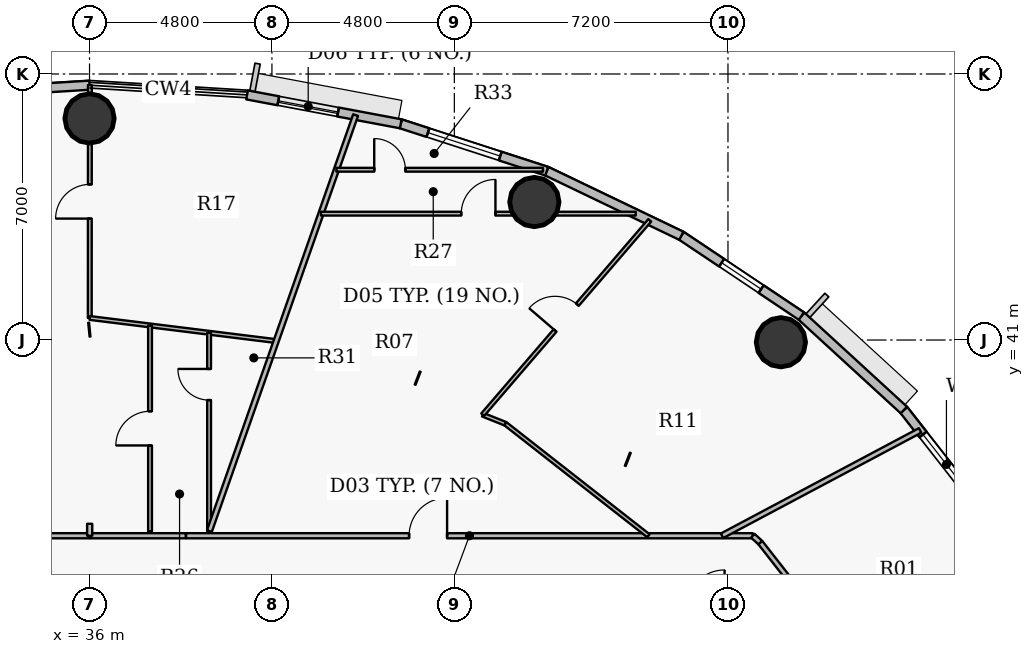
"""IFC4 building model, lengths in metres.
Left out: names, types, materials, properties, quantities, classifications, styles, units other than length and angle.
Written with IfcOpenShell. Run it as: python <this file> out.ifc"""

import sys

from ifc_helpers import new_model, si_unit, direction, frame, frame_2d, origin, origin_2d, place, context, subcontext, project, spatial, rectangle, hollow_circle, extrude, source, transform, mapped, element, fill, save


model = new_model("IFC4")
c1 = context("Model", 3, precision=1e-05, world=origin(), true_north=direction((0.0, 1.0)))
c2 = subcontext(c1, "Body", "Model", "MODEL_VIEW")
j1 = project(units=[si_unit("LENGTHUNIT", "METRE"), si_unit("PLANEANGLEUNIT", "RADIAN")], contexts=[c1])
p1 = place(None, origin())
s1 = spatial("IfcSite", under=j1, at=p1, CompositionType="ELEMENT")
p2 = place(p1, origin())
s2 = spatial("IfcBuilding", under=s1, at=p2, CompositionType="ELEMENT")
p3 = place(p2, frame((0.0, 0.0, 174.9)))
s3 = spatial("IfcBuildingStorey", under=s2, at=p3, CompositionType="ELEMENT", Elevation=174.9)
for number, where, z_axis, x_axis in (
    (1, (54.192, 40.942, 0.0), (0.0, 0.0, 1.0), (1.0, 0.0, 0.0)),
    (2, (47.706, 44.631, 0.0), (0.0, 0.0, 1.0), (1.0, 0.0, 0.0)),
    (3, (36.0, 46.83, 0.0), (0.0, 0.0, 1.0), (1.0, 0.0, 0.0)),
):
    element("IfcColumn", number, at=place(p3, frame(where, z_axis=z_axis, x_axis=x_axis)), inside=s3, PredefinedType="COLUMN", context=c2, shape_type="SweptSolid", body=[
        extrude(hollow_circle(Radius=0.65, WallThickness=0.04, at=origin_2d()), origin(), (0.0, 0.0, 1.0), 3.75),
    ])
p4 = place(p3, frame((57.428, 39.158, 0.0), z_axis=(0.0, 0.0, 1.0), x_axis=(0.616287674549, -0.787521112224, 0.0)))
e4 = element("IfcWall", 4, at=p4, inside=s3, PredefinedType="SOLIDWALL", context=c2, shape_type="SweptSolid", body=[
    extrude(rectangle(XDim=3.517, YDim=0.24, at=frame_2d((1.759, 0.0))), origin(), (0.0, 0.0, 1.0), 3.5),
])
p5 = place(p4, frame((0.819, 0.0, 0.9)))
e5 = element("IfcOpeningElement", 5, at=p5, cuts=e4, PredefinedType="OPENING", context=c2, shape_type="SweptSolid", body=[
    extrude(rectangle(XDim=2.0, YDim=1.75, at=origin_2d()), frame((1.0, 0.13, 0.875), z_axis=(0.0, -1.0, 0.0), x_axis=(1.0, 0.0, 0.0)), (0.0, 0.0, 1.0), 0.26),
])
p6 = place(p3, frame((54.732, 41.631, 0.0), z_axis=(0.0, 0.0, 1.0), x_axis=(0.737076565834, -0.675809245349, 0.0)))
e6 = element("IfcWall", 6, at=p6, inside=s3, PredefinedType="SOLIDWALL", context=c2, shape_type="SweptSolid", body=[
    extrude(rectangle(XDim=3.658, YDim=0.24, at=frame_2d((1.829, 0.0))), origin(), (0.0, 0.0, 1.0), 3.5),
])
p7 = place(p3, frame((51.573, 43.743, 0.0), z_axis=(0.0, 0.0, 1.0), x_axis=(0.831228998277, -0.555930168657, 0.0)))
e7 = element("IfcWall", 7, at=p7, inside=s3, PredefinedType="SOLIDWALL", context=c2, shape_type="SweptSolid", body=[
    extrude(rectangle(XDim=3.8, YDim=0.24, at=frame_2d((1.9, 0.0))), origin(), (0.0, 0.0, 1.0), 3.5),
])
p8 = place(p7, frame((1.275, 0.0, 0.9)))
e8 = element("IfcOpeningElement", 8, at=p8, cuts=e7, PredefinedType="OPENING", context=c2, shape_type="SweptSolid", body=[
    extrude(rectangle(XDim=1.25, YDim=1.65, at=origin_2d()), frame((0.625, 0.13, 0.825), z_axis=(0.0, -1.0, 0.0), x_axis=(1.0, 0.0, 0.0)), (0.0, 0.0, 1.0), 0.26),
])
p9 = place(p3, frame((48.03, 45.444, 0.0), z_axis=(0.0, 0.0, 1.0), x_axis=(0.901564733809, -0.432644231155, 0.0)))
e9 = element("IfcWall", 9, at=p9, inside=s3, PredefinedType="SOLIDWALL", context=c2, shape_type="SweptSolid", body=[
    extrude(rectangle(XDim=3.93, YDim=0.24, at=frame_2d((1.965, 0.0))), origin(), (0.0, 0.0, 1.0), 3.5),
])
p10 = place(p3, frame((44.189, 46.689, 0.0), z_axis=(0.0, 0.0, 1.0), x_axis=(0.951209870236, -0.30854462038, 0.0)))
e10 = element("IfcWall", 10, at=p10, inside=s3, PredefinedType="SOLIDWALL", context=c2, shape_type="SweptSolid", body=[
    extrude(rectangle(XDim=4.038, YDim=0.24, at=frame_2d((2.019, 0.0))), origin(), (0.0, 0.0, 1.0), 3.5),
])
p11 = place(p10, frame((0.753, 0.0, 0.9)))
e11 = element("IfcOpeningElement", 11, at=p11, cuts=e10, PredefinedType="OPENING", context=c2, shape_type="SweptSolid", body=[
    extrude(rectangle(XDim=2.0, YDim=1.75, at=origin_2d()), frame((1.0, 0.13, 0.875), z_axis=(0.0, -1.0, 0.0), x_axis=(1.0, 0.0, 0.0)), (0.0, 0.0, 1.0), 0.26),
])
p12 = place(p3, frame((40.146, 47.449, 0.0), z_axis=(0.0, 0.0, 1.0), x_axis=(0.982788108205, -0.184736391573, 0.0)))
e12 = element("IfcWall", 12, at=p12, inside=s3, PredefinedType="SOLIDWALL", context=c2, shape_type="SweptSolid", body=[
    extrude(rectangle(XDim=4.114, YDim=0.24, at=frame_2d((2.057, 0.0))), origin(), (0.0, 0.0, 1.0), 3.5),
])
p13 = place(p12, frame((0.836, 0.0, 0.9)))
e13 = element("IfcOpeningElement", 13, at=p13, cuts=e12, PredefinedType="OPENING", context=c2, shape_type="SweptSolid", body=[
    extrude(rectangle(XDim=1.6, YDim=1.75, at=origin_2d()), frame((0.8, 0.13, 0.875), z_axis=(0.0, -1.0, 0.0), x_axis=(1.0, 0.0, 0.0)), (0.0, 0.0, 1.0), 0.26),
])
p14 = place(p3, frame((31.854, 47.449, 0.0), z_axis=(0.0, 0.0, 1.0), x_axis=(0.998104600619, 0.061540281305, 0.0)))
e14 = element("IfcWall", 14, at=p14, inside=s3, PredefinedType="SOLIDWALL", context=c2, shape_type="SweptSolid", body=[
    extrude(rectangle(XDim=4.154, YDim=0.24, at=frame_2d((2.077, 0.0))), origin(), (0.0, 0.0, 1.0), 3.5),
])
p15 = place(p14, frame((1.082, 0.0, 0.9)))
e15 = element("IfcOpeningElement", 15, at=p15, cuts=e14, PredefinedType="OPENING", context=c2, shape_type="SweptSolid", body=[
    extrude(rectangle(XDim=2.0, YDim=1.75, at=origin_2d()), frame((1.0, 0.13, 0.875), z_axis=(0.0, -1.0, 0.0), x_axis=(1.0, 0.0, 0.0)), (0.0, 0.0, 1.0), 0.26),
])
p16 = place(p3, frame((24.35, 35.85, 0.0), z_axis=(0.0, 0.0, 1.0), x_axis=(1.0, 0.0, 0.0)))
e16 = element("IfcWall", 16, at=p16, inside=s3, PredefinedType="PARTITIONING", context=c2, shape_type="SweptSolid", body=[
    extrude(rectangle(XDim=11.654, YDim=0.135, at=frame_2d((5.827, 0.0))), origin(), (0.0, 0.0, 1.0), 2.935),
])
p17 = place(p16, frame((7.592, 0.0, 0.0)))
e17 = element("IfcOpeningElement", 17, at=p17, cuts=e16, PredefinedType="OPENING", context=c2, shape_type="SweptSolid", body=[
    extrude(rectangle(XDim=1.0, YDim=2.15, at=origin_2d()), frame((0.5, 0.078, 1.075), z_axis=(0.0, -1.0, 0.0), x_axis=(1.0, 0.0, 0.0)), (0.0, 0.0, 1.0), 0.155),
])
p18 = place(p3, frame((36.007, 41.58, 0.0), z_axis=(0.0, 0.0, 1.0), x_axis=(0.000477973338, 0.999999885771, 0.0)))
e18 = element("IfcWall", 18, at=p18, inside=s3, PredefinedType="PARTITIONING", context=c2, shape_type="SweptSolid", body=[
    extrude(rectangle(XDim=6.129, YDim=0.1, at=frame_2d((3.065, 0.0))), origin(), (0.0, 0.0, 1.0), 2.935),
])
p19 = place(p18, frame((2.615, 0.0, 0.0)))
e19 = element("IfcOpeningElement", 19, at=p19, cuts=e18, PredefinedType="OPENING", context=c2, shape_type="SweptSolid", body=[
    extrude(rectangle(XDim=0.9, YDim=2.1, at=origin_2d()), frame((0.45, 0.06, 1.05), z_axis=(0.0, -1.0, 0.0), x_axis=(1.0, 0.0, 0.0)), (0.0, 0.0, 1.0), 0.12),
])
p20 = place(p3, frame((36.007, 41.58, 0.0), z_axis=(0.0, 0.0, 1.0), x_axis=(0.992395965764, -0.123086340169, 0.0)))
e20 = element("IfcWall", 20, at=p20, inside=s3, PredefinedType="PARTITIONING", context=c2, shape_type="SweptSolid", body=[
    extrude(rectangle(XDim=4.943, YDim=0.1, at=frame_2d((2.471, 0.0))), origin(), (0.0, 0.0, 1.0), 2.935),
])
p21 = place(p3, frame((37.592, 35.968, 0.0), z_axis=(0.0, 0.0, 1.0), x_axis=(0.0, 1.0, 0.0)))
e21 = element("IfcWall", 21, at=p21, inside=s3, PredefinedType="PARTITIONING", context=c2, shape_type="SweptSolid", body=[
    extrude(rectangle(XDim=5.416, YDim=0.1, at=frame_2d((2.708, 0.0))), origin(), (0.0, 0.0, 1.0), 3.5),
])
p22 = place(p21, frame((2.258, 0.0, 0.0)))
e22 = element("IfcOpeningElement", 22, at=p22, cuts=e21, PredefinedType="OPENING", context=c2, shape_type="SweptSolid", body=[
    extrude(rectangle(XDim=0.9, YDim=2.1, at=origin_2d()), frame((0.45, 0.06, 1.05), z_axis=(0.0, -1.0, 0.0), x_axis=(1.0, 0.0, 0.0)), (0.0, 0.0, 1.0), 0.12),
])
p23 = place(p3, frame((38.541, 35.85, 0.0), z_axis=(0.0, 0.0, 1.0), x_axis=(1.0, 0.0, 0.0)))
e23 = element("IfcWall", 23, at=p23, inside=s3, PredefinedType="PARTITIONING", context=c2, shape_type="SweptSolid", body=[
    extrude(rectangle(XDim=14.913, YDim=0.135, at=frame_2d((7.456, 0.0))), origin(), (0.0, 0.0, 1.0), 2.935),
])
p24 = place(p23, frame((5.868, 0.0, 0.0)))
e24 = element("IfcOpeningElement", 24, at=p24, cuts=e23, PredefinedType="OPENING", context=c2, shape_type="SweptSolid", body=[
    extrude(rectangle(XDim=1.0, YDim=2.15, at=origin_2d()), frame((0.5, 0.078, 1.075), z_axis=(0.0, -1.0, 0.0), x_axis=(1.0, 0.0, 0.0)), (0.0, 0.0, 1.0), 0.155),
])
p25 = place(p3, frame((39.146, 35.973, 0.0), z_axis=(0.0, 0.0, 1.0), x_axis=(0.0, 1.0, 0.0)))
e25 = element("IfcWall", 25, at=p25, inside=s3, PredefinedType="PARTITIONING", context=c2, shape_type="SweptSolid", body=[
    extrude(rectangle(XDim=5.218, YDim=0.1, at=frame_2d((2.609, 0.0))), origin(), (0.0, 0.0, 1.0), 3.5),
])
p26 = place(p25, frame((3.446, 0.0, 0.0)))
e26 = element("IfcOpeningElement", 26, at=p26, cuts=e25, PredefinedType="OPENING", context=c2, shape_type="SweptSolid", body=[
    extrude(rectangle(XDim=0.82, YDim=2.1, at=origin_2d()), frame((0.41, 0.06, 1.05), z_axis=(0.0, -1.0, 0.0), x_axis=(1.0, 0.0, 0.0)), (0.0, 0.0, 1.0), 0.12),
])
p27 = place(p3, frame((39.154, 35.972, 0.0), z_axis=(0.0, 0.0, 1.0), x_axis=(0.331639887377, 0.94340605526, 0.0)))
e27 = element("IfcWall", 27, at=p27, inside=s3, PredefinedType="PARTITIONING", context=c2, shape_type="SweptSolid", body=[
    extrude(rectangle(XDim=11.602, YDim=0.135, at=frame_2d((5.801, 0.0))), origin(), (0.0, 0.0, 1.0), 2.935),
])
p28 = place(p3, frame((42.09, 44.325, 0.0), z_axis=(0.0, 0.0, 1.0), x_axis=(1.0, 0.0, 0.0)))
e28 = element("IfcWall", 28, at=p28, inside=s3, PredefinedType="PARTITIONING", context=c2, shape_type="SweptSolid", body=[
    extrude(rectangle(XDim=8.282, YDim=0.1, at=frame_2d((4.141, 0.0))), origin(), (0.0, 0.0, 1.0), 2.935),
])
p29 = place(p28, frame((3.691, 0.0, 0.0)))
e29 = element("IfcOpeningElement", 29, at=p29, cuts=e28, PredefinedType="OPENING", context=c2, shape_type="SweptSolid", body=[
    extrude(rectangle(XDim=0.9, YDim=2.1, at=origin_2d()), frame((0.45, 0.06, 1.05), z_axis=(0.0, -1.0, 0.0), x_axis=(1.0, 0.0, 0.0)), (0.0, 0.0, 1.0), 0.12),
])
p30 = place(p3, frame((42.497, 45.48, 0.0), z_axis=(0.0, 0.0, 1.0), x_axis=(1.0, 0.0, 0.0)))
e30 = element("IfcWall", 30, at=p30, inside=s3, PredefinedType="PARTITIONING", context=c2, shape_type="SweptSolid", body=[
    extrude(rectangle(XDim=5.435, YDim=0.1, at=frame_2d((2.718, 0.0))), origin(), (0.0, 0.0, 1.0), 2.935),
])
p31 = place(p30, frame((0.995, 0.0, 0.0)))
e31 = element("IfcOpeningElement", 31, at=p31, cuts=e30, PredefinedType="OPENING", context=c2, shape_type="SweptSolid", body=[
    extrude(rectangle(XDim=0.82, YDim=2.1, at=origin_2d()), frame((0.41, 0.06, 1.05), z_axis=(0.0, -1.0, 0.0), x_axis=(1.0, 0.0, 0.0)), (0.0, 0.0, 1.0), 0.12),
])
p32 = place(p3, frame((46.346, 39.035, 0.0), z_axis=(0.0, 0.0, 1.0), x_axis=(0.928841988182, -0.370476127423, 0.0)))
e32 = element("IfcWall", 32, at=p32, inside=s3, PredefinedType="PARTITIONING", context=c2, shape_type="SweptSolid", body=[
    extrude(rectangle(XDim=0.645, YDim=0.1, at=frame_2d((0.322, 0.0))), origin(), (0.0, 0.0, 1.0), 3.5),
])
p33 = place(p3, frame((46.346, 39.035, 0.0), z_axis=(0.0, 0.0, 1.0), x_axis=(0.651891052095, 0.758312637504, 0.0)))
e33 = element("IfcWall", 33, at=p33, inside=s3, PredefinedType="PARTITIONING", context=c2, shape_type="SweptSolid", body=[
    extrude(rectangle(XDim=6.742, YDim=0.1, at=frame_2d((3.371, 0.0))), origin(), (0.0, 0.0, 1.0), 2.935),
])
p34 = place(p33, frame((2.921, 0.0, 0.0)))
e34 = element("IfcOpeningElement", 34, at=p34, cuts=e33, PredefinedType="OPENING", context=c2, shape_type="SweptSolid", body=[
    extrude(rectangle(XDim=0.9, YDim=2.1, at=origin_2d()), frame((0.45, 0.06, 1.05), z_axis=(0.0, -1.0, 0.0), x_axis=(1.0, 0.0, 0.0)), (0.0, 0.0, 1.0), 0.12),
])
p35 = place(p3, frame((46.945, 38.796, 0.0), z_axis=(0.0, 0.0, 1.0), x_axis=(0.787326008068, -0.616536906454, 0.0)))
e35 = element("IfcWall", 35, at=p35, inside=s3, PredefinedType="PARTITIONING", context=c2, shape_type="SweptSolid", body=[
    extrude(rectangle(XDim=4.779, YDim=0.1, at=frame_2d((2.389, 0.0))), origin(), (0.0, 0.0, 1.0), 2.935),
])
p36 = place(p3, frame((52.645, 35.85, 0.0), z_axis=(0.0, 0.0, 1.0), x_axis=(0.882944268091, 0.469477815712, 0.0)))
e36 = element("IfcWall", 36, at=p36, inside=s3, PredefinedType="PARTITIONING", context=c2, shape_type="SweptSolid", body=[
    extrude(rectangle(XDim=5.902, YDim=0.135, at=frame_2d((2.951, 0.0))), origin(), (0.0, 0.0, 1.0), 2.935),
])
p37 = place(p3, frame((53.454, 35.85, 0.0), z_axis=(0.0, 0.0, 1.0), x_axis=(0.736667385572, -0.676255249913, 0.0)))
e37 = element("IfcWall", 37, at=p37, inside=s3, PredefinedType="PARTITIONING", context=c2, shape_type="SweptSolid", body=[
    extrude(rectangle(XDim=0.271, YDim=0.135, at=frame_2d((0.135, 0.0))), origin(), (0.0, 0.0, 1.0), 3.5),
])
p38 = place(p3, frame((53.653, 35.667, 0.0), z_axis=(0.0, 0.0, 1.0), x_axis=(0.616302223209, -0.787509726713, 0.0)))
e38 = element("IfcWall", 38, at=p38, inside=s3, PredefinedType="PARTITIONING", context=c2, shape_type="SweptSolid", body=[
    extrude(rectangle(XDim=2.18, YDim=0.135, at=frame_2d((1.09, 0.0))), origin(), (0.0, 0.0, 1.0), 3.5),
])
p39 = place(p3, frame((36.014, 35.85, 0.0), z_axis=(0.0, 0.0, 1.0), x_axis=(1.0, 0.0, 0.0)))
e39 = element("IfcWall", 39, at=p39, inside=s3, PredefinedType="PARTITIONING", context=c2, shape_type="SweptSolid", body=[
    extrude(rectangle(XDim=2.517, YDim=0.135, at=frame_2d((1.259, 0.0))), origin(), (0.0, 0.0, 1.0), 2.935),
])
p40 = place(p3, frame((36.004, 36.165, 0.0), z_axis=(0.0, 0.0, 1.0), x_axis=(0.0, -1.0, 0.0)))
e40 = element("IfcWall", 40, at=p40, inside=s3, PredefinedType="PARTITIONING", context=c2, shape_type="SweptSolid", body=[
    extrude(rectangle(XDim=0.315, YDim=0.135, at=frame_2d((0.157, 0.0))), origin(), (0.0, 0.0, 1.0), 2.935),
])
m1 = source(origin(), c2, "Body", "SweptSolid", [
    extrude(rectangle(XDim=2.0, YDim=1.75, at=origin_2d()), frame((1.0, 0.03, 0.875), z_axis=(0.0, -1.0, 0.0), x_axis=(1.0, 0.0, 0.0)), (0.0, 0.0, 1.0), 0.06),
])
p41 = place(p5, origin())
e41 = element("IfcWindow", 41, at=p41, inside=s3, PartitioningType="DOUBLE_PANEL_VERTICAL", PredefinedType="WINDOW", context=c2, shape_type="MappedRepresentation", body=[
    mapped(m1, transform((0.0, 0.0, 0.0), x_axis=(1.0, 0.0, 0.0), y_axis=(0.0, 1.0, 0.0), z_axis=(0.0, 0.0, 1.0), scale=1.0)),
])
fill(e5, e41)
p42 = place(p11, origin())
e42 = element("IfcWindow", 42, at=p42, inside=s3, PartitioningType="DOUBLE_PANEL_VERTICAL", PredefinedType="WINDOW", context=c2, shape_type="MappedRepresentation", body=[
    mapped(m1, transform((0.0, 0.0, 0.0), x_axis=(1.0, 0.0, 0.0), y_axis=(0.0, 1.0, 0.0), z_axis=(0.0, 0.0, 1.0), scale=1.0)),
])
fill(e11, e42)
m2 = source(origin(), c2, "Body", "SweptSolid", [
    extrude(rectangle(XDim=1.6, YDim=1.75, at=origin_2d()), frame((0.8, 0.03, 0.875), z_axis=(0.0, -1.0, 0.0), x_axis=(1.0, 0.0, 0.0)), (0.0, 0.0, 1.0), 0.06),
])
p43 = place(p13, origin())
e43 = element("IfcWindow", 43, at=p43, inside=s3, PartitioningType="DOUBLE_PANEL_VERTICAL", PredefinedType="WINDOW", context=c2, shape_type="MappedRepresentation", body=[
    mapped(m2, transform((0.0, 0.0, 0.0), x_axis=(1.0, 0.0, 0.0), y_axis=(0.0, 1.0, 0.0), z_axis=(0.0, 0.0, 1.0), scale=1.0)),
])
fill(e13, e43)
m3 = source(origin(), c2, "Body", "SweptSolid", [
    extrude(rectangle(XDim=1.25, YDim=1.65, at=origin_2d()), frame((0.625, 0.03, 0.825), z_axis=(0.0, -1.0, 0.0), x_axis=(1.0, 0.0, 0.0)), (0.0, 0.0, 1.0), 0.06),
])
p44 = place(p8, origin())
e44 = element("IfcWindow", 44, at=p44, inside=s3, PartitioningType="SINGLE_PANEL", PredefinedType="WINDOW", context=c2, shape_type="MappedRepresentation", body=[
    mapped(m3, transform((0.0, 0.0, 0.0), x_axis=(1.0, 0.0, 0.0), y_axis=(0.0, 1.0, 0.0), z_axis=(0.0, 0.0, 1.0), scale=1.0)),
])
fill(e8, e44)
m4 = source(origin(), c2, "Body", "SweptSolid", [
    extrude(rectangle(XDim=1.0, YDim=2.15, at=origin_2d()), frame((0.5, 0.025, 1.075), z_axis=(0.0, -1.0, 0.0), x_axis=(1.0, 0.0, 0.0)), (0.0, 0.0, 1.0), 0.05),
])
p45 = place(p24, origin())
e45 = element("IfcDoor", 45, at=p45, inside=s3, OperationType="SINGLE_SWING_RIGHT", PredefinedType="DOOR", context=c2, shape_type="MappedRepresentation", body=[
    mapped(m4, transform((0.0, 0.0, 0.0), x_axis=(1.0, 0.0, 0.0), y_axis=(0.0, 1.0, 0.0), z_axis=(0.0, 0.0, 1.0), scale=1.0)),
])
fill(e24, e45)
m5 = source(origin(), c2, "Body", "SweptSolid", [
    extrude(rectangle(XDim=0.9, YDim=2.1, at=origin_2d()), frame((0.45, 0.025, 1.05), z_axis=(0.0, -1.0, 0.0), x_axis=(1.0, 0.0, 0.0)), (0.0, 0.0, 1.0), 0.05),
])
p46 = place(p34, origin())
e46 = element("IfcDoor", 46, at=p46, inside=s3, OperationType="SINGLE_SWING_LEFT", PredefinedType="DOOR", context=c2, shape_type="MappedRepresentation", body=[
    mapped(m5, transform((0.0, 0.0, 0.0), x_axis=(1.0, 0.0, 0.0), y_axis=(0.0, 1.0, 0.0), z_axis=(0.0, 0.0, 1.0), scale=1.0)),
])
fill(e34, e46)
p47 = place(p29, origin())
e47 = element("IfcDoor", 47, at=p47, inside=s3, OperationType="SINGLE_SWING_RIGHT", PredefinedType="DOOR", context=c2, shape_type="MappedRepresentation", body=[
    mapped(m5, transform((0.0, 0.0, 0.0), x_axis=(1.0, 0.0, 0.0), y_axis=(0.0, 1.0, 0.0), z_axis=(0.0, 0.0, 1.0), scale=1.0)),
])
fill(e29, e47)
m6 = source(origin(), c2, "Body", "SweptSolid", [
    extrude(rectangle(XDim=0.82, YDim=2.1, at=origin_2d()), frame((0.41, 0.025, 1.05), z_axis=(0.0, -1.0, 0.0), x_axis=(1.0, 0.0, 0.0)), (0.0, 0.0, 1.0), 0.05),
])
p48 = place(p31, origin())
e48 = element("IfcDoor", 48, at=p48, inside=s3, OperationType="SINGLE_SWING_LEFT", PredefinedType="DOOR", context=c2, shape_type="MappedRepresentation", body=[
    mapped(m6, transform((0.0, 0.0, 0.0), x_axis=(1.0, 0.0, 0.0), y_axis=(0.0, 1.0, 0.0), z_axis=(0.0, 0.0, 1.0), scale=1.0)),
])
fill(e31, e48)
p49 = place(p19, origin())
e49 = element("IfcDoor", 49, at=p49, inside=s3, OperationType="SINGLE_SWING_LEFT", PredefinedType="DOOR", context=c2, shape_type="MappedRepresentation", body=[
    mapped(m5, transform((0.0, 0.0, 0.0), x_axis=(1.0, 0.0, 0.0), y_axis=(0.0, 1.0, 0.0), z_axis=(0.0, 0.0, 1.0), scale=1.0)),
])
fill(e19, e49)
p50 = place(p22, origin())
e50 = element("IfcDoor", 50, at=p50, inside=s3, OperationType="SINGLE_SWING_LEFT", PredefinedType="DOOR", context=c2, shape_type="MappedRepresentation", body=[
    mapped(m5, transform((0.0, 0.0, 0.0), x_axis=(1.0, 0.0, 0.0), y_axis=(0.0, 1.0, 0.0), z_axis=(0.0, 0.0, 1.0), scale=1.0)),
])
fill(e22, e50)
p51 = place(p26, origin())
e51 = element("IfcDoor", 51, at=p51, inside=s3, OperationType="SINGLE_SWING_RIGHT", PredefinedType="DOOR", context=c2, shape_type="MappedRepresentation", body=[
    mapped(m6, transform((0.0, 0.0, 0.0), x_axis=(1.0, 0.0, 0.0), y_axis=(0.0, 1.0, 0.0), z_axis=(0.0, 0.0, 1.0), scale=1.0)),
])
fill(e26, e51)
save(model, sys.argv[1])
